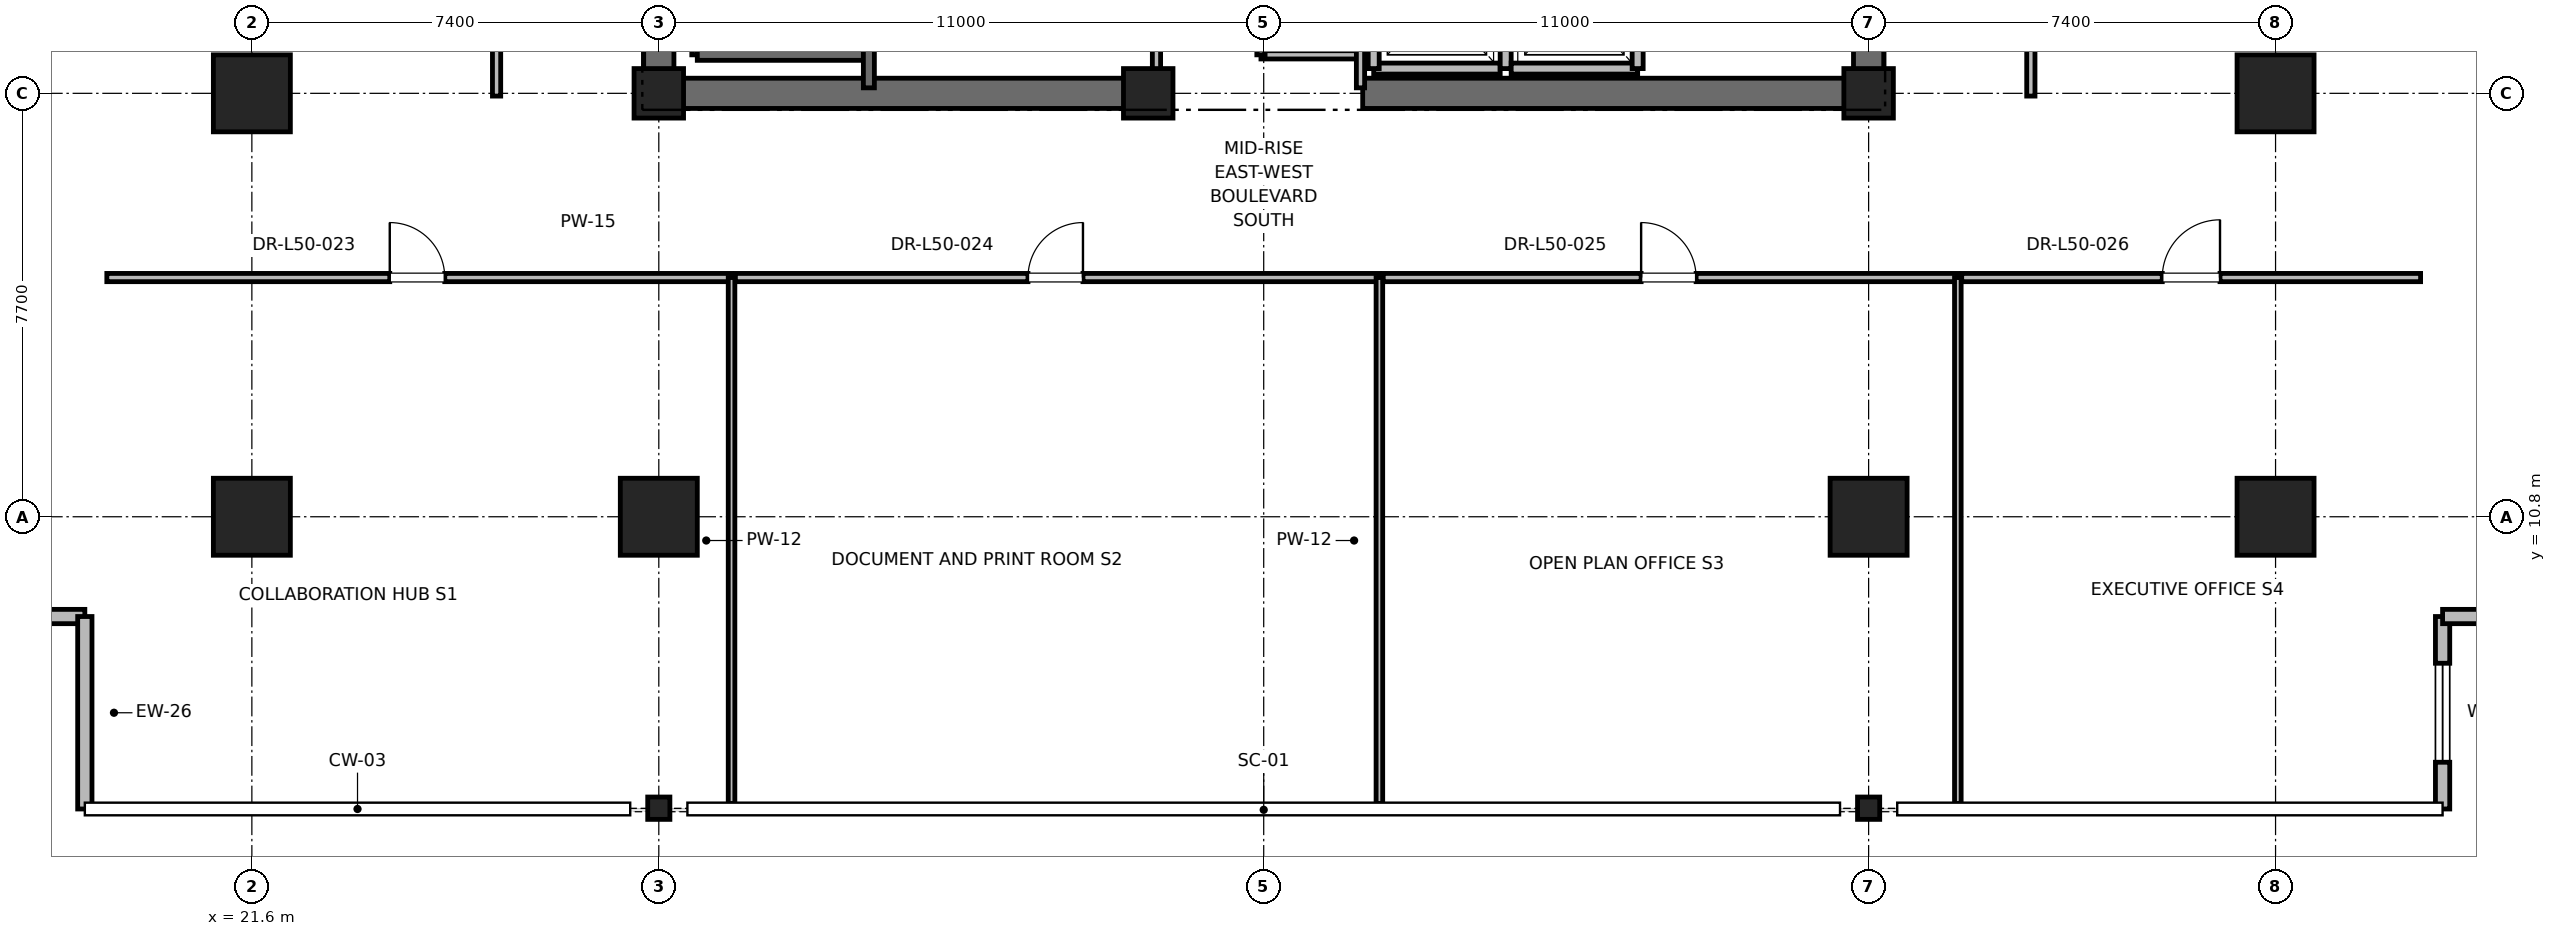
"""IFC4 building model, lengths in metres.
Left out: names, types, materials, properties, quantities, classifications, styles, units other than length and angle.
Written with IfcOpenShell. Run it as: python <this file> out.ifc"""

import sys

from ifc_helpers import new_model, si_unit, direction, frame, frame_2d, origin, origin_2d, place, context, subcontext, project, spatial, rectangle, i_section, extrude, element, fill, save


model = new_model("IFC4")
c1 = context("Model", 3, precision=1e-05, world=origin(), true_north=direction((0.0, 1.0)))
c2 = subcontext(c1, "Body", "Model", "MODEL_VIEW")
j1 = project(units=[si_unit("LENGTHUNIT", "METRE"), si_unit("PLANEANGLEUNIT", "RADIAN")], contexts=[c1])
p1 = place(None, origin())
s1 = spatial("IfcSite", under=j1, at=p1, CompositionType="ELEMENT")
p2 = place(p1, origin())
s2 = spatial("IfcBuilding", under=s1, at=p2, CompositionType="ELEMENT")
p3 = place(p2, frame((0.0, 0.0, 217.2)))
s3 = spatial("IfcBuildingStorey", under=s2, at=p3, CompositionType="ELEMENT", Elevation=217.2)
for number, where, z_axis, x_axis in (
    (1, (29.0, 10.8, 0.0), (0.0, 0.0, 1.0), (1.0, 0.0, 0.0)),
    (2, (51.0, 10.8, 0.0), (0.0, 0.0, 1.0), (1.0, 0.0, 0.0)),
    (3, (21.6, 18.5, 0.0), (0.0, 0.0, 1.0), (1.0, 0.0, 0.0)),
    (4, (58.4, 18.5, 0.0), (0.0, 0.0, 1.0), (1.0, 0.0, 0.0)),
    (5, (21.6, 10.8, 0.0), (0.0, 0.0, 1.0), (1.0, 0.0, 0.0)),
    (6, (58.4, 10.8, 0.0), (0.0, 0.0, 1.0), (1.0, 0.0, 0.0)),
):
    element("IfcColumn", number, at=place(p3, frame(where, z_axis=z_axis, x_axis=x_axis)), inside=s3, PredefinedType="COLUMN", context=c2, shape_type="SweptSolid", body=[
        extrude(rectangle(XDim=1.4, YDim=1.4, at=origin_2d()), origin(), (0.0, 0.0, 1.0), 4.0),
    ])
for number, where, z_axis, x_axis in (
    (7, (29.0, 5.5, 0.0), (0.0, 0.0, 1.0), (1.0, 0.0, 0.0)),
    (8, (51.0, 5.5, 0.0), (0.0, 0.0, 1.0), (1.0, 0.0, 0.0)),
):
    element("IfcColumn", number, at=place(p3, frame(where, z_axis=z_axis, x_axis=x_axis)), inside=s3, PredefinedType="COLUMN", context=c2, shape_type="SweptSolid", body=[
        extrude(i_section(OverallWidth=0.403, OverallDepth=0.406, WebThickness=0.027, FlangeThickness=0.043, FilletRadius=0.015, at=origin_2d()), origin(), (0.0, 0.0, 1.0), 4.0),
    ])
for number, where, z_axis, x_axis in (
    (9, (29.0, 18.5, 0.0), (0.0, 0.0, 1.0), (1.0, 0.0, 0.0)),
    (10, (51.0, 18.5, 0.0), (0.0, 0.0, 1.0), (1.0, 0.0, 0.0)),
    (11, (37.9, 18.5, 0.0), (0.0, 0.0, 1.0), (1.0, 0.0, 0.0)),
):
    element("IfcColumn", number, at=place(p3, frame(where, z_axis=z_axis, x_axis=x_axis)), inside=s3, PredefinedType="PILASTER", context=c2, shape_type="SweptSolid", body=[
        extrude(rectangle(XDim=0.9, YDim=0.9, at=origin_2d()), origin(), (0.0, 0.0, 1.0), 4.0),
    ])
for number, where, z_axis, x_axis in (
    (12, (29.0, 18.5, 0.0), (0.0, 0.0, 1.0), (1.0, 0.0, 0.0)),
    (13, (41.8, 18.5, 0.0), (0.0, 0.0, 1.0), (1.0, 0.0, 0.0)),
):
    element("IfcWall", number, at=place(p3, frame(where, z_axis=z_axis, x_axis=x_axis)), inside=s3, PredefinedType="SHEAR", context=c2, shape_type="SweptSolid", body=[
        extrude(rectangle(XDim=9.2, YDim=0.55, at=frame_2d((4.6, 0.0))), origin(), (0.0, 0.0, 1.0), 3.775),
    ])
p4 = place(p3, frame((29.0, 18.5, 0.0), z_axis=(0.0, 0.0, 1.0), x_axis=(0.0, 1.0, 0.0)))
e14 = element("IfcWall", 14, at=p4, inside=s3, PredefinedType="SHEAR", context=c2, shape_type="SweptSolid", body=[
    extrude(rectangle(XDim=8.8, YDim=0.55, at=frame_2d((4.4, 0.0))), origin(), (0.0, 0.0, 1.0), 3.775),
])
p5 = place(p3, frame((51.0, 18.5, 0.0), z_axis=(0.0, 0.0, 1.0), x_axis=(0.0, 1.0, 0.0)))
e15 = element("IfcWall", 15, at=p5, inside=s3, PredefinedType="SHEAR", context=c2, shape_type="SweptSolid", body=[
    extrude(rectangle(XDim=5.8, YDim=0.55, at=frame_2d((2.9, 0.0))), origin(), (0.0, 0.0, 1.0), 3.775),
])
p6 = place(p3, frame((14.562, 8.986, 0.0), z_axis=(0.0, 0.0, 1.0), x_axis=(1.0, 0.0, 0.0)))
e16 = element("IfcWall", 16, at=p6, inside=s3, PredefinedType="PARAPET", context=c2, shape_type="SweptSolid", body=[
    extrude(rectangle(XDim=4.0, YDim=0.26, at=frame_2d((2.0, 0.0))), origin(), (0.0, 0.0, 1.0), 3.775),
])
p7 = place(p6, frame((1.1, 0.0, 0.85)))
e17 = element("IfcOpeningElement", 17, at=p7, cuts=e16, PredefinedType="OPENING", context=c2, shape_type="SweptSolid", body=[
    extrude(rectangle(XDim=1.8, YDim=2.2, at=frame_2d((0.9, 1.1))), frame((0.0, 0.13, 0.0), z_axis=(0.0, -1.0, 0.0), x_axis=(1.0, 0.0, 0.0)), (0.0, 0.0, 1.0), 0.26),
])
p8 = place(p3, frame((18.562, 8.986, 0.0), z_axis=(0.0, 0.0, 1.0), x_axis=(0.0, -1.0, 0.0)))
e18 = element("IfcWall", 18, at=p8, inside=s3, PredefinedType="PARAPET", context=c2, shape_type="SweptSolid", body=[
    extrude(rectangle(XDim=3.5, YDim=0.26, at=frame_2d((1.75, 0.0))), origin(), (0.0, 0.0, 1.0), 3.775),
])
p9 = place(p3, frame((61.438, 5.486, 0.0), z_axis=(0.0, 0.0, 1.0), x_axis=(0.0, 1.0, 0.0)))
e19 = element("IfcWall", 19, at=p9, inside=s3, PredefinedType="PARAPET", context=c2, shape_type="SweptSolid", body=[
    extrude(rectangle(XDim=3.5, YDim=0.26, at=frame_2d((1.75, 0.0))), origin(), (0.0, 0.0, 1.0), 3.775),
])
p10 = place(p9, frame((0.85, 0.0, 0.85)))
e20 = element("IfcOpeningElement", 20, at=p10, cuts=e19, PredefinedType="OPENING", context=c2, shape_type="SweptSolid", body=[
    extrude(rectangle(XDim=1.8, YDim=2.2, at=frame_2d((0.9, 1.1))), frame((0.0, 0.13, 0.0), z_axis=(0.0, -1.0, 0.0), x_axis=(1.0, 0.0, 0.0)), (0.0, 0.0, 1.0), 0.26),
])
p11 = place(p3, frame((61.438, 8.986, 0.0), z_axis=(0.0, 0.0, 1.0), x_axis=(1.0, 0.0, 0.0)))
e21 = element("IfcWall", 21, at=p11, inside=s3, PredefinedType="PARAPET", context=c2, shape_type="SweptSolid", body=[
    extrude(rectangle(XDim=4.0, YDim=0.26, at=frame_2d((2.0, 0.0))), origin(), (0.0, 0.0, 1.0), 3.775),
])
p12 = place(p3, frame((29.7, 19.2, 0.0), z_axis=(0.0, 0.0, 1.0), x_axis=(0.0, 1.0, 0.0)))
e22 = element("IfcWall", 22, at=p12, inside=s3, PredefinedType="SOLIDWALL", context=c2, shape_type="SweptSolid", body=[
    extrude(rectangle(XDim=8.15, YDim=0.2, at=frame_2d((4.075, 0.0))), origin(), (0.0, 0.0, 1.0), 3.775),
])
p13 = place(p3, frame((29.7, 19.2, 0.0), z_axis=(0.0, 0.0, 1.0), x_axis=(1.0, 0.0, 0.0)))
e23 = element("IfcWall", 23, at=p13, inside=s3, PredefinedType="SOLIDWALL", context=c2, shape_type="SweptSolid", body=[
    extrude(rectangle(XDim=3.12, YDim=0.2, at=frame_2d((1.56, 0.0))), origin(), (0.0, 0.0, 1.0), 3.775),
])
p14 = place(p3, frame((32.82, 18.6, 0.0), z_axis=(0.0, 0.0, 1.0), x_axis=(0.0, 1.0, 0.0)))
e24 = element("IfcWall", 24, at=p14, inside=s3, PredefinedType="SOLIDWALL", context=c2, shape_type="SweptSolid", body=[
    extrude(rectangle(XDim=8.78, YDim=0.2, at=frame_2d((4.39, 0.0))), origin(), (0.0, 0.0, 1.0), 3.775),
])
p15 = place(p3, frame((42.0, 18.95, 0.0), z_axis=(0.0, 0.0, 1.0), x_axis=(1.0, 0.0, 0.0)))
e25 = element("IfcWall", 25, at=p15, inside=s3, PredefinedType="SOLIDWALL", context=c2, shape_type="SweptSolid", body=[
    extrude(rectangle(XDim=2.3, YDim=0.2, at=frame_2d((1.15, 0.0))), origin(), (0.0, 0.0, 1.0), 2.755),
])
p16 = place(p3, frame((42.0, 21.55, 0.0), z_axis=(0.0, 0.0, 1.0), x_axis=(0.0, -1.0, 0.0)))
e26 = element("IfcWall", 26, at=p16, inside=s3, PredefinedType="SOLIDWALL", context=c2, shape_type="SweptSolid", body=[
    extrude(rectangle(XDim=2.6, YDim=0.2, at=frame_2d((1.3, 0.0))), origin(), (0.0, 0.0, 1.0), 2.755),
])
p17 = place(p3, frame((44.4, 18.95, 0.0), z_axis=(0.0, 0.0, 1.0), x_axis=(0.0, 1.0, 0.0)))
e27 = element("IfcWall", 27, at=p17, inside=s3, PredefinedType="SOLIDWALL", context=c2, shape_type="SweptSolid", body=[
    extrude(rectangle(XDim=2.6, YDim=0.2, at=frame_2d((1.3, 0.0))), origin(), (0.0, 0.0, 1.0), 3.775),
])
p18 = place(p3, frame((44.5, 18.95, 0.0), z_axis=(0.0, 0.0, 1.0), x_axis=(1.0, 0.0, 0.0)))
e28 = element("IfcWall", 28, at=p18, inside=s3, PredefinedType="SOLIDWALL", context=c2, shape_type="SweptSolid", body=[
    extrude(rectangle(XDim=2.3, YDim=0.2, at=frame_2d((1.15, 0.0))), origin(), (0.0, 0.0, 1.0), 3.775),
])
p19 = place(p3, frame((46.8, 18.95, 0.0), z_axis=(0.0, 0.0, 1.0), x_axis=(0.0, 1.0, 0.0)))
e29 = element("IfcWall", 29, at=p19, inside=s3, PredefinedType="SOLIDWALL", context=c2, shape_type="SweptSolid", body=[
    extrude(rectangle(XDim=2.6, YDim=0.2, at=frame_2d((1.3, 0.0))), origin(), (0.0, 0.0, 1.0), 3.775),
])
p20 = place(p3, frame((39.95, 19.2, 0.0), z_axis=(0.0, 0.0, 1.0), x_axis=(1.0, 0.0, 0.0)))
e30 = element("IfcWall", 30, at=p20, inside=s3, PredefinedType="PARTITIONING", context=c2, shape_type="SweptSolid", body=[
    extrude(rectangle(XDim=1.81, YDim=0.15, at=frame_2d((0.905, 0.0))), origin(), (0.0, 0.0, 1.0), 2.85),
])
p21 = place(p3, frame((41.76, 18.6, 0.0), z_axis=(0.0, 0.0, 1.0), x_axis=(0.0, 1.0, 0.0)))
e31 = element("IfcWall", 31, at=p21, inside=s3, PredefinedType="PARTITIONING", context=c2, shape_type="SweptSolid", body=[
    extrude(rectangle(XDim=3.6, YDim=0.15, at=frame_2d((1.8, 0.0))), origin(), (0.0, 0.0, 1.0), 2.755),
])
p22 = place(p3, frame((39.95, 19.2, 0.0), z_axis=(0.0, 0.0, 1.0), x_axis=(0.0, 1.0, 0.0)))
e32 = element("IfcWall", 32, at=p22, inside=s3, PredefinedType="PARTITIONING", context=c2, shape_type="SweptSolid", body=[
    extrude(rectangle(XDim=3.0, YDim=0.15, at=frame_2d((1.5, 0.0))), origin(), (0.0, 0.0, 1.0), 2.85),
])
p23 = place(p22, frame((1.05, 0.0, 0.0)))
e33 = element("IfcOpeningElement", 33, at=p23, cuts=e32, PredefinedType="OPENING", context=c2, shape_type="SweptSolid", body=[
    extrude(rectangle(XDim=0.9, YDim=2.1, at=frame_2d((0.45, 1.05))), frame((0.0, 0.075, 0.0), z_axis=(0.0, -1.0, 0.0), x_axis=(1.0, 0.0, 0.0)), (0.0, 0.0, 1.0), 0.15),
])
p24 = place(p3, frame((38.05, 18.6, 0.0), z_axis=(0.0, 0.0, 1.0), x_axis=(0.0, 1.0, 0.0)))
e34 = element("IfcWall", 34, at=p24, inside=s3, PredefinedType="PARTITIONING", context=c2, shape_type="SweptSolid", body=[
    extrude(rectangle(XDim=4.46, YDim=0.15, at=frame_2d((2.23, 0.0))), origin(), (0.0, 0.0, 1.0), 2.755),
])
p25 = place(p24, frame((1.73, 0.0, 0.0)))
e35 = element("IfcOpeningElement", 35, at=p25, cuts=e34, PredefinedType="OPENING", context=c2, shape_type="SweptSolid", body=[
    extrude(rectangle(XDim=1.0, YDim=2.15, at=frame_2d((0.5, 1.075))), frame((0.0, 0.075, 0.0), z_axis=(0.0, -1.0, 0.0), x_axis=(1.0, 0.0, 0.0)), (0.0, 0.0, 1.0), 0.15),
])
p26 = place(p3, frame((18.963, 15.15, 0.0), z_axis=(0.0, 0.0, 1.0), x_axis=(1.0, 0.0, 0.0)))
e36 = element("IfcWall", 36, at=p26, inside=s3, PredefinedType="PARTITIONING", context=c2, shape_type="SweptSolid", body=[
    extrude(rectangle(XDim=11.36, YDim=0.15, at=frame_2d((5.68, 0.0))), origin(), (0.0, 0.0, 1.0), 2.85),
])
p27 = place(p26, frame((5.145, 0.0, 0.0)))
e37 = element("IfcOpeningElement", 37, at=p27, cuts=e36, PredefinedType="OPENING", context=c2, shape_type="SweptSolid", body=[
    extrude(rectangle(XDim=1.0, YDim=2.15, at=frame_2d((0.5, 1.075))), frame((0.0, 0.075, 0.0), z_axis=(0.0, -1.0, 0.0), x_axis=(1.0, 0.0, 0.0)), (0.0, 0.0, 1.0), 0.15),
])
p28 = place(p3, frame((30.323, 5.586, 0.0), z_axis=(0.0, 0.0, 1.0), x_axis=(0.0, 1.0, 0.0)))
e38 = element("IfcWall", 38, at=p28, inside=s3, PredefinedType="PARTITIONING", context=c2, shape_type="SweptSolid", body=[
    extrude(rectangle(XDim=9.564, YDim=0.12, at=frame_2d((4.782, 0.0))), origin(), (0.0, 0.0, 1.0), 2.405),
])
p29 = place(p3, frame((30.393, 15.15, 0.0), z_axis=(0.0, 0.0, 1.0), x_axis=(1.0, 0.0, 0.0)))
e39 = element("IfcWall", 39, at=p29, inside=s3, PredefinedType="PARTITIONING", context=c2, shape_type="SweptSolid", body=[
    extrude(rectangle(XDim=11.711, YDim=0.15, at=frame_2d((5.855, 0.0))), origin(), (0.0, 0.0, 1.0), 2.85),
])
p30 = place(p29, frame((5.321, 0.0, 0.0)))
e40 = element("IfcOpeningElement", 40, at=p30, cuts=e39, PredefinedType="OPENING", context=c2, shape_type="SweptSolid", body=[
    extrude(rectangle(XDim=1.0, YDim=2.15, at=frame_2d((0.5, 1.075))), frame((0.0, 0.075, 0.0), z_axis=(0.0, -1.0, 0.0), x_axis=(1.0, 0.0, 0.0)), (0.0, 0.0, 1.0), 0.15),
])
p31 = place(p3, frame((42.104, 5.586, 0.0), z_axis=(0.0, 0.0, 1.0), x_axis=(0.0, 1.0, 0.0)))
e41 = element("IfcWall", 41, at=p31, inside=s3, PredefinedType="PARTITIONING", context=c2, shape_type="SweptSolid", body=[
    extrude(rectangle(XDim=9.564, YDim=0.12, at=frame_2d((4.782, 0.0))), origin(), (0.0, 0.0, 1.0), 2.405),
])
p32 = place(p3, frame((42.174, 15.15, 0.0), z_axis=(0.0, 0.0, 1.0), x_axis=(1.0, 0.0, 0.0)))
e42 = element("IfcWall", 42, at=p32, inside=s3, PredefinedType="PARTITIONING", context=c2, shape_type="SweptSolid", body=[
    extrude(rectangle(XDim=10.449, YDim=0.15, at=frame_2d((5.224, 0.0))), origin(), (0.0, 0.0, 1.0), 2.85),
])
p33 = place(p32, frame((4.689, 0.0, 0.0)))
e43 = element("IfcOpeningElement", 43, at=p33, cuts=e42, PredefinedType="OPENING", context=c2, shape_type="SweptSolid", body=[
    extrude(rectangle(XDim=1.0, YDim=2.15, at=frame_2d((0.5, 1.075))), frame((0.0, 0.075, 0.0), z_axis=(0.0, -1.0, 0.0), x_axis=(1.0, 0.0, 0.0)), (0.0, 0.0, 1.0), 0.15),
])
p34 = place(p3, frame((52.622, 5.586, 0.0), z_axis=(0.0, 0.0, 1.0), x_axis=(0.0, 1.0, 0.0)))
e44 = element("IfcWall", 44, at=p34, inside=s3, PredefinedType="PARTITIONING", context=c2, shape_type="SweptSolid", body=[
    extrude(rectangle(XDim=9.564, YDim=0.12, at=frame_2d((4.782, 0.0))), origin(), (0.0, 0.0, 1.0), 2.85),
])
p35 = place(p3, frame((52.692, 15.15, 0.0), z_axis=(0.0, 0.0, 1.0), x_axis=(1.0, 0.0, 0.0)))
e45 = element("IfcWall", 45, at=p35, inside=s3, PredefinedType="PARTITIONING", context=c2, shape_type="SweptSolid", body=[
    extrude(rectangle(XDim=8.345, YDim=0.15, at=frame_2d((4.172, 0.0))), origin(), (0.0, 0.0, 1.0), 2.85),
])
p36 = place(p35, frame((3.647, 0.0, 0.0)))
e46 = element("IfcOpeningElement", 46, at=p36, cuts=e45, PredefinedType="OPENING", context=c2, shape_type="SweptSolid", body=[
    extrude(rectangle(XDim=1.05, YDim=2.2, at=frame_2d((0.525, 1.1))), frame((0.0, 0.075, 0.0), z_axis=(0.0, -1.0, 0.0), x_axis=(1.0, 0.0, 0.0)), (0.0, 0.0, 1.0), 0.15),
])
p37 = place(p3, frame((26.05, 18.45, 0.0), z_axis=(0.0, 0.0, 1.0), x_axis=(0.0, 1.0, 0.0)))
e47 = element("IfcWall", 47, at=p37, inside=s3, PredefinedType="PARTITIONING", context=c2, shape_type="SweptSolid", body=[
    extrude(rectangle(XDim=7.602, YDim=0.15, at=frame_2d((3.801, 0.0))), origin(), (0.0, 0.0, 1.0), 2.85),
])
p38 = place(p37, frame((3.091, 0.0, 0.0)))
e48 = element("IfcOpeningElement", 48, at=p38, cuts=e47, PredefinedType="OPENING", context=c2, shape_type="SweptSolid", body=[
    extrude(rectangle(XDim=1.5, YDim=2.25, at=frame_2d((0.75, 1.125))), frame((0.0, 0.075, 0.0), z_axis=(0.0, -1.0, 0.0), x_axis=(1.0, 0.0, 0.0)), (0.0, 0.0, 1.0), 0.15),
])
p39 = place(p3, frame((53.95, 18.45, 0.0), z_axis=(0.0, 0.0, 1.0), x_axis=(0.0, 1.0, 0.0)))
e49 = element("IfcWall", 49, at=p39, inside=s3, PredefinedType="PARTITIONING", context=c2, shape_type="SweptSolid", body=[
    extrude(rectangle(XDim=10.498, YDim=0.15, at=frame_2d((5.249, 0.0))), origin(), (0.0, 0.0, 1.0), 2.85),
])
p40 = place(p39, frame((4.789, 0.0, 0.0)))
e50 = element("IfcOpeningElement", 50, at=p40, cuts=e49, PredefinedType="OPENING", context=c2, shape_type="SweptSolid", body=[
    extrude(rectangle(XDim=1.0, YDim=2.15, at=frame_2d((0.5, 1.075))), frame((0.0, 0.075, 0.0), z_axis=(0.0, -1.0, 0.0), x_axis=(1.0, 0.0, 0.0)), (0.0, 0.0, 1.0), 0.15),
])
p41 = place(p10, origin())
e51 = element("IfcWindow", 51, at=p41, inside=s3, PartitioningType="SINGLE_PANEL", PredefinedType="WINDOW", context=c2, shape_type="SweptSolid", body=[
    extrude(rectangle(XDim=1.8, YDim=2.2, at=frame_2d((0.9, 1.1))), frame((0.0, 0.03, 0.0), z_axis=(0.0, -1.0, 0.0), x_axis=(1.0, 0.0, 0.0)), (0.0, 0.0, 1.0), 0.06),
])
fill(e20, e51)
p42 = place(p27, origin())
e52 = element("IfcDoor", 52, at=p42, inside=s3, OperationType="SINGLE_SWING_LEFT", PredefinedType="DOOR", context=c2, shape_type="SweptSolid", body=[
    extrude(rectangle(XDim=1.0, YDim=2.15, at=frame_2d((0.5, 1.075))), frame((0.0, 0.025, 0.0), z_axis=(0.0, -1.0, 0.0), x_axis=(1.0, 0.0, 0.0)), (0.0, 0.0, 1.0), 0.05),
])
fill(e37, e52)
p43 = place(p30, origin())
e53 = element("IfcDoor", 53, at=p43, inside=s3, OperationType="SINGLE_SWING_RIGHT", PredefinedType="DOOR", context=c2, shape_type="SweptSolid", body=[
    extrude(rectangle(XDim=1.0, YDim=2.15, at=frame_2d((0.5, 1.075))), frame((0.0, 0.025, 0.0), z_axis=(0.0, -1.0, 0.0), x_axis=(1.0, 0.0, 0.0)), (0.0, 0.0, 1.0), 0.05),
])
fill(e40, e53)
p44 = place(p33, origin())
e54 = element("IfcDoor", 54, at=p44, inside=s3, OperationType="SINGLE_SWING_LEFT", PredefinedType="DOOR", context=c2, shape_type="SweptSolid", body=[
    extrude(rectangle(XDim=1.0, YDim=2.15, at=frame_2d((0.5, 1.075))), frame((0.0, 0.025, 0.0), z_axis=(0.0, -1.0, 0.0), x_axis=(1.0, 0.0, 0.0)), (0.0, 0.0, 1.0), 0.05),
])
fill(e43, e54)
p45 = place(p36, origin())
e55 = element("IfcDoor", 55, at=p45, inside=s3, OperationType="SINGLE_SWING_RIGHT", PredefinedType="DOOR", context=c2, shape_type="SweptSolid", body=[
    extrude(rectangle(XDim=1.05, YDim=2.2, at=frame_2d((0.525, 1.1))), frame((0.0, 0.025, 0.0), z_axis=(0.0, -1.0, 0.0), x_axis=(1.0, 0.0, 0.0)), (0.0, 0.0, 1.0), 0.05),
])
fill(e46, e55)
save(model, sys.argv[1])
